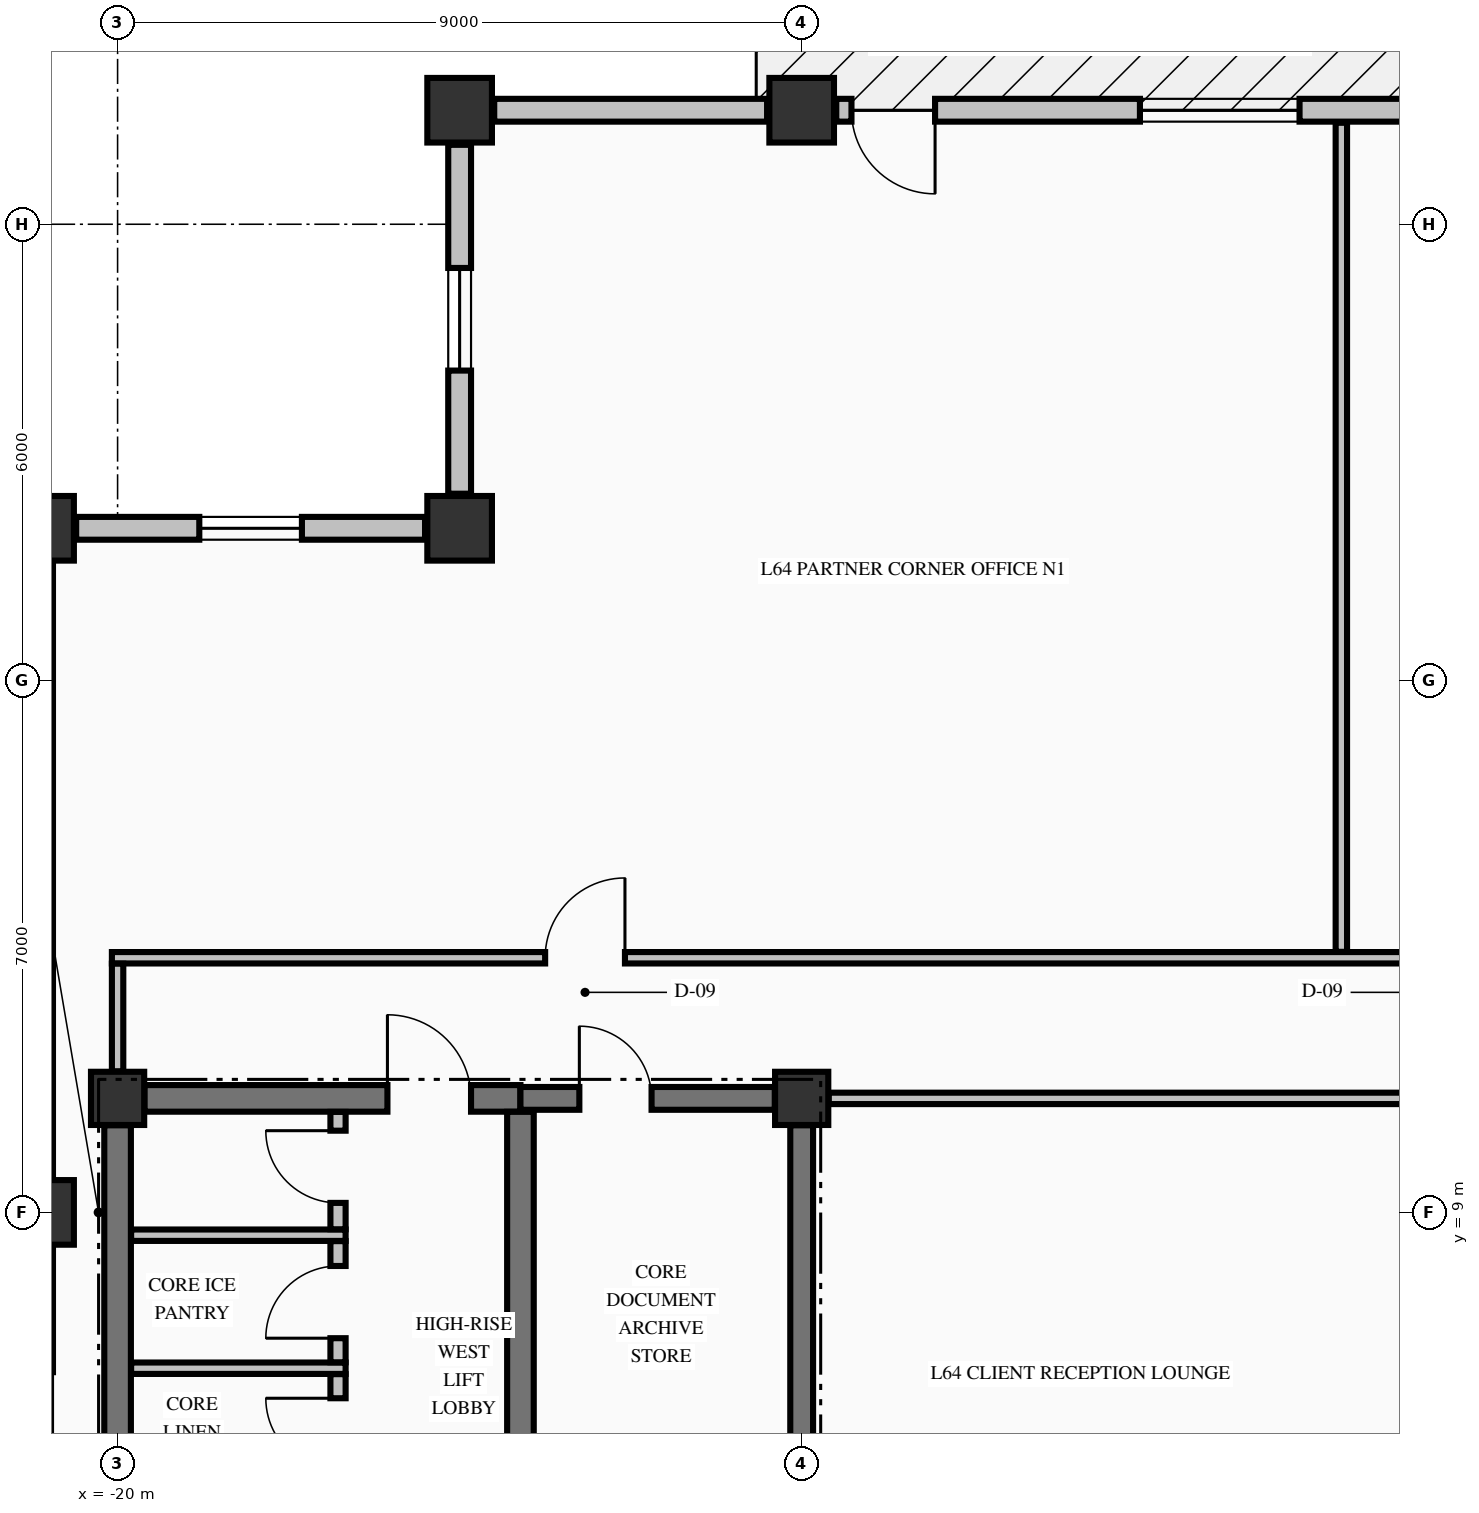
"""IFC4 building model, lengths in metres.
Left out: names, types, materials, properties, quantities, classifications, styles, units other than length and angle.
Written with IfcOpenShell. Run it as: python <this file> out.ifc"""

import sys

from ifc_helpers import new_model, si_unit, direction, frame, frame_2d, origin, origin_2d, place, context, subcontext, project, spatial, rectangle, extrude, element, fill, save


model = new_model("IFC4")
c1 = context("Model", 3, precision=1e-05, world=origin(), true_north=direction((0.0, 1.0)))
c2 = subcontext(c1, "Body", "Model", "MODEL_VIEW")
j1 = project(units=[si_unit("LENGTHUNIT", "METRE"), si_unit("PLANEANGLEUNIT", "RADIAN")], contexts=[c1])
p1 = place(None, origin())
s1 = spatial("IfcSite", under=j1, at=p1, CompositionType="ELEMENT")
p2 = place(p1, origin())
s2 = spatial("IfcBuilding", under=s1, at=p2, CompositionType="ELEMENT")
p3 = place(p2, frame((0.0, 0.0, 242.97)))
s3 = spatial("IfcBuildingStorey", under=s2, at=p3, CompositionType="ELEMENT", Elevation=242.97)
for number, where, z_axis, x_axis in (
    (1, (-15.5, 23.5, -0.25), (0.0, 0.0, 1.0), (1.0, 0.0, 0.0)),
    (2, (-11.0, 23.5, -0.25), (0.0, 0.0, 1.0), (1.0, 0.0, 0.0)),
    (3, (-21.0, 9.0, -0.25), (0.0, 0.0, 1.0), (1.0, 0.0, 0.0)),
    (4, (-21.0, 18.0, -0.25), (0.0, 0.0, 1.0), (1.0, 0.0, 0.0)),
    (5, (-15.5, 18.0, -0.25), (0.0, 0.0, 1.0), (1.0, 0.0, 0.0)),
):
    element("IfcColumn", number, at=place(p3, frame(where, z_axis=z_axis, x_axis=x_axis)), inside=s3, PredefinedType="COLUMN", context=c2, shape_type="SweptSolid", body=[
        extrude(rectangle(XDim=0.85, YDim=0.85, at=origin_2d()), origin(), (0.0, 0.0, 1.0), 3.23),
    ])
for number, where, z_axis, x_axis in (
    (6, (-20.0, 10.5, -0.25), (0.0, 0.0, 1.0), (1.0, 0.0, 0.0)),
    (7, (-11.0, 10.5, -0.25), (0.0, 0.0, 1.0), (1.0, 0.0, 0.0)),
):
    element("IfcColumn", number, at=place(p3, frame(where, z_axis=z_axis, x_axis=x_axis)), inside=s3, PredefinedType="COLUMN", context=c2, shape_type="SweptSolid", body=[
        extrude(rectangle(XDim=0.7, YDim=0.7, at=origin_2d()), origin(), (0.0, 0.0, 1.0), 3.23),
    ])
p4 = place(p3, frame((-15.5, 23.045, 0.0), z_axis=(0.0, 0.0, 1.0), x_axis=(0.0, -1.0, 0.0)))
e8 = element("IfcWall", 8, at=p4, inside=s3, PredefinedType="STANDARD", context=c2, shape_type="SweptSolid", body=[
    extrude(rectangle(XDim=4.59, YDim=0.3, at=frame_2d((2.295, 0.0))), origin(), (0.0, 0.0, 1.0), 2.372),
])
p5 = place(p4, frame((1.62, 0.0, 0.68)))
e9 = element("IfcOpeningElement", 9, at=p5, cuts=e8, PredefinedType="OPENING", context=c2, shape_type="SweptSolid", body=[
    extrude(rectangle(XDim=1.35, YDim=1.42, at=frame_2d((0.675, 0.71))), frame((0.0, 0.16, 0.0), z_axis=(0.0, -1.0, 0.0), x_axis=(1.0, 0.0, 0.0)), (0.0, 0.0, 1.0), 0.32),
])
p6 = place(p3, frame((-15.955, 18.0, 0.0), z_axis=(0.0, 0.0, 1.0), x_axis=(-1.0, 0.0, 0.0)))
e10 = element("IfcWall", 10, at=p6, inside=s3, PredefinedType="STANDARD", context=c2, shape_type="SweptSolid", body=[
    extrude(rectangle(XDim=4.59, YDim=0.3, at=frame_2d((2.295, 0.0))), origin(), (0.0, 0.0, 1.0), 2.372),
])
p7 = place(p6, frame((1.62, 0.0, 0.68)))
e11 = element("IfcOpeningElement", 11, at=p7, cuts=e10, PredefinedType="OPENING", context=c2, shape_type="SweptSolid", body=[
    extrude(rectangle(XDim=1.35, YDim=1.42, at=frame_2d((0.675, 0.71))), frame((0.0, 0.16, 0.0), z_axis=(0.0, -1.0, 0.0), x_axis=(1.0, 0.0, 0.0)), (0.0, 0.0, 1.0), 0.32),
])
p8 = place(p3, frame((-11.455, 23.5, 0.0), z_axis=(0.0, 0.0, 1.0), x_axis=(-1.0, 0.0, 0.0)))
e12 = element("IfcWall", 12, at=p8, inside=s3, PredefinedType="STANDARD", context=c2, shape_type="SweptSolid", body=[
    extrude(rectangle(XDim=3.59, YDim=0.3, at=frame_2d((1.795, 0.0))), origin(), (0.0, 0.0, 1.0), 2.372),
])
p9 = place(p3, frame((-0.455, 23.5, 0.0), z_axis=(0.0, 0.0, 1.0), x_axis=(-1.0, 0.0, 0.0)))
e13 = element("IfcWall", 13, at=p9, inside=s3, PredefinedType="STANDARD", context=c2, shape_type="SweptSolid", body=[
    extrude(rectangle(XDim=10.09, YDim=0.3, at=frame_2d((5.045, 0.0))), origin(), (0.0, 0.0, 1.0), 2.372),
])
p10 = place(p9, frame((8.79, 0.0, 0.0)))
e14 = element("IfcOpeningElement", 14, at=p10, cuts=e13, PredefinedType="OPENING", context=c2, shape_type="SweptSolid", body=[
    extrude(rectangle(XDim=1.1, YDim=2.15, at=frame_2d((0.55, 1.075))), frame((0.0, 0.16, 0.0), z_axis=(0.0, -1.0, 0.0), x_axis=(1.0, 0.0, 0.0)), (0.0, 0.0, 1.0), 0.32),
])
p11 = place(p9, frame((3.995, 0.0, 0.7)))
e15 = element("IfcOpeningElement", 15, at=p11, cuts=e13, PredefinedType="OPENING", context=c2, shape_type="SweptSolid", body=[
    extrude(rectangle(XDim=2.1, YDim=1.5, at=frame_2d((1.05, 0.75))), frame((0.0, 0.16, 0.0), z_axis=(0.0, -1.0, 0.0), x_axis=(1.0, 0.0, 0.0)), (0.0, 0.0, 1.0), 0.32),
])
p12 = place(p3, frame((-21.0, 8.545, 0.0), z_axis=(0.0, 0.0, 1.0), x_axis=(0.0, -1.0, 0.0)))
e16 = element("IfcWall", 16, at=p12, inside=s3, PredefinedType="STANDARD", context=c2, shape_type="SweptSolid", body=[
    extrude(rectangle(XDim=8.09, YDim=0.3, at=frame_2d((4.045, 0.0))), origin(), (0.0, 0.0, 1.0), 2.372),
])
p13 = place(p12, frame((1.647, 0.0, 0.7)))
e17 = element("IfcOpeningElement", 17, at=p13, cuts=e16, PredefinedType="OPENING", context=c2, shape_type="SweptSolid", body=[
    extrude(rectangle(XDim=2.1, YDim=1.5, at=frame_2d((1.05, 0.75))), frame((0.0, 0.16, 0.0), z_axis=(0.0, -1.0, 0.0), x_axis=(1.0, 0.0, 0.0)), (0.0, 0.0, 1.0), 0.32),
])
p14 = place(p12, frame((4.343, 0.0, 0.7)))
e18 = element("IfcOpeningElement", 18, at=p14, cuts=e16, PredefinedType="OPENING", context=c2, shape_type="SweptSolid", body=[
    extrude(rectangle(XDim=2.1, YDim=1.5, at=frame_2d((1.05, 0.75))), frame((0.0, 0.16, 0.0), z_axis=(0.0, -1.0, 0.0), x_axis=(1.0, 0.0, 0.0)), (0.0, 0.0, 1.0), 0.32),
])
p15 = place(p3, frame((-21.0, 17.545, 0.0), z_axis=(0.0, 0.0, 1.0), x_axis=(0.0, -1.0, 0.0)))
e19 = element("IfcWall", 19, at=p15, inside=s3, PredefinedType="STANDARD", context=c2, shape_type="SweptSolid", body=[
    extrude(rectangle(XDim=8.09, YDim=0.3, at=frame_2d((4.045, 0.0))), origin(), (0.0, 0.0, 1.0), 2.372),
])
p16 = place(p3, frame((-19.646, 10.5, 0.0), z_axis=(0.0, 0.0, 1.0), x_axis=(1.0, 0.0, 0.0)))
e20 = element("IfcWall", 20, at=p16, inside=s3, PredefinedType="SHEAR", context=c2, shape_type="SweptSolid", body=[
    extrude(rectangle(XDim=4.946, YDim=0.35, at=frame_2d((2.473, 0.0))), origin(), (0.0, 0.0, 1.0), 2.98),
])
p17 = place(p16, frame((3.196, 0.0, 0.0)))
e21 = element("IfcOpeningElement", 21, at=p17, cuts=e20, PredefinedType="OPENING", context=c2, shape_type="SweptSolid", body=[
    extrude(rectangle(XDim=1.1, YDim=2.15, at=frame_2d((0.55, 1.075))), frame((0.0, 0.185, 0.0), z_axis=(0.0, -1.0, 0.0), x_axis=(1.0, 0.0, 0.0)), (0.0, 0.0, 1.0), 0.37),
])
p18 = place(p3, frame((-14.7, 10.5, 0.0), z_axis=(0.0, 0.0, 1.0), x_axis=(1.0, 0.0, 0.0)))
e22 = element("IfcWall", 22, at=p18, inside=s3, PredefinedType="SHEAR", context=c2, shape_type="SweptSolid", body=[
    extrude(rectangle(XDim=3.346, YDim=0.3, at=frame_2d((1.673, 0.0))), origin(), (0.0, 0.0, 1.0), 2.98),
])
p19 = place(p18, frame((0.775, 0.0, 0.0)))
e23 = element("IfcOpeningElement", 23, at=p19, cuts=e22, PredefinedType="OPENING", context=c2, shape_type="SweptSolid", body=[
    extrude(rectangle(XDim=0.95, YDim=2.15, at=frame_2d((0.475, 1.075))), frame((0.0, 0.16, 0.0), z_axis=(0.0, -1.0, 0.0), x_axis=(1.0, 0.0, 0.0)), (0.0, 0.0, 1.0), 0.32),
])
for number, where, z_axis, x_axis in (
    (24, (-19.822, 6.95, 0.0), (0.0, 0.0, 1.0), (1.0, 0.0, 0.0)),
    (25, (-19.822, 8.7, 0.0), (0.0, 0.0, 1.0), (1.0, 0.0, 0.0)),
):
    element("IfcWall", number, at=place(p3, frame(where, z_axis=z_axis, x_axis=x_axis)), inside=s3, PredefinedType="PARTITIONING", context=c2, shape_type="SweptSolid", body=[
        extrude(rectangle(XDim=2.822, YDim=0.15, at=frame_2d((1.411, 0.0))), origin(), (0.0, 0.0, 1.0), 2.98),
    ])
p20 = place(p3, frame((-10.644, 10.5, 0.0), z_axis=(0.0, 0.0, 1.0), x_axis=(1.0, 0.0, 0.0)))
e26 = element("IfcWall", 26, at=p20, inside=s3, PredefinedType="PARTITIONING", context=c2, shape_type="SweptSolid", body=[
    extrude(rectangle(XDim=21.288, YDim=0.15, at=frame_2d((10.644, 0.0))), origin(), (0.0, 0.0, 1.0), 2.98),
])
p21 = place(p20, frame((13.544, 0.0, 0.0)))
e27 = element("IfcOpeningElement", 27, at=p21, cuts=e26, PredefinedType="OPENING", context=c2, shape_type="SweptSolid", body=[
    extrude(rectangle(XDim=1.1, YDim=2.15, at=frame_2d((0.55, 1.075))), frame((0.0, 0.085, 0.0), z_axis=(0.0, -1.0, 0.0), x_axis=(1.0, 0.0, 0.0)), (0.0, 0.0, 1.0), 0.17),
])
p22 = place(p3, frame((-20.075, 12.35, 0.0), z_axis=(0.0, 0.0, 1.0), x_axis=(1.0, 0.0, 0.0)))
e28 = element("IfcWall", 28, at=p22, inside=s3, PredefinedType="PARTITIONING", context=c2, shape_type="SweptSolid", body=[
    extrude(rectangle(XDim=45.91, YDim=0.15, at=frame_2d((22.955, 0.0))), origin(), (0.0, 0.0, 1.0), 2.98),
])
p23 = place(p22, frame((5.7, 0.0, 0.0)))
e29 = element("IfcOpeningElement", 29, at=p23, cuts=e28, PredefinedType="OPENING", context=c2, shape_type="SweptSolid", body=[
    extrude(rectangle(XDim=1.05, YDim=2.15, at=frame_2d((0.525, 1.075))), frame((0.0, 0.085, 0.0), z_axis=(0.0, -1.0, 0.0), x_axis=(1.0, 0.0, 0.0)), (0.0, 0.0, 1.0), 0.17),
])
p24 = place(p22, frame((17.3, 0.0, 0.0)))
e30 = element("IfcOpeningElement", 30, at=p24, cuts=e28, PredefinedType="OPENING", context=c2, shape_type="SweptSolid", body=[
    extrude(rectangle(XDim=1.05, YDim=2.15, at=frame_2d((0.525, 1.075))), frame((0.0, 0.085, 0.0), z_axis=(0.0, -1.0, 0.0), x_axis=(1.0, 0.0, 0.0)), (0.0, 0.0, 1.0), 0.17),
])
p25 = place(p22, frame((32.5, 0.0, 0.0)))
e31 = element("IfcOpeningElement", 31, at=p25, cuts=e28, PredefinedType="OPENING", context=c2, shape_type="SweptSolid", body=[
    extrude(rectangle(XDim=1.05, YDim=2.15, at=frame_2d((0.525, 1.075))), frame((0.0, 0.085, 0.0), z_axis=(0.0, -1.0, 0.0), x_axis=(1.0, 0.0, 0.0)), (0.0, 0.0, 1.0), 0.17),
])
p26 = place(p3, frame((-20.0, 5.327, 0.0), z_axis=(0.0, 0.0, 1.0), x_axis=(0.0, 1.0, 0.0)))
e32 = element("IfcWall", 32, at=p26, inside=s3, PredefinedType="SHEAR", context=c2, shape_type="SweptSolid", body=[
    extrude(rectangle(XDim=4.819, YDim=0.35, at=frame_2d((2.41, 0.0))), origin(), (0.0, 0.0, 1.0), 2.98),
])
p27 = place(p3, frame((-14.7, 5.852, 0.0), z_axis=(0.0, 0.0, 1.0), x_axis=(0.0, 1.0, 0.0)))
e33 = element("IfcWall", 33, at=p27, inside=s3, PredefinedType="SHEAR", context=c2, shape_type="SweptSolid", body=[
    extrude(rectangle(XDim=4.471, YDim=0.35, at=frame_2d((2.235, 0.0))), origin(), (0.0, 0.0, 1.0), 2.98),
])
p28 = place(p3, frame((-11.0, 5.852, 0.0), z_axis=(0.0, 0.0, 1.0), x_axis=(0.0, 1.0, 0.0)))
e34 = element("IfcWall", 34, at=p28, inside=s3, PredefinedType="SHEAR", context=c2, shape_type="SweptSolid", body=[
    extrude(rectangle(XDim=4.294, YDim=0.3, at=frame_2d((2.147, 0.0))), origin(), (0.0, 0.0, 1.0), 2.98),
])
p29 = place(p3, frame((-20.0, 10.856, 0.0), z_axis=(0.0, 0.0, 1.0), x_axis=(0.0, 1.0, 0.0)))
e35 = element("IfcWall", 35, at=p29, inside=s3, PredefinedType="PARTITIONING", context=c2, shape_type="SweptSolid", body=[
    extrude(rectangle(XDim=1.416, YDim=0.15, at=frame_2d((0.708, 0.0))), origin(), (0.0, 0.0, 1.0), 2.57),
])
p30 = place(p3, frame((-17.1, 5.328, 0.0), z_axis=(0.0, 0.0, 1.0), x_axis=(0.0, 1.0, 0.0)))
e36 = element("IfcWall", 36, at=p30, inside=s3, PredefinedType="PARTITIONING", context=c2, shape_type="SweptSolid", body=[
    extrude(rectangle(XDim=1.544, YDim=0.2, at=frame_2d((0.772, 0.0))), origin(), (0.0, 0.0, 1.0), 2.98),
])
p31 = place(p30, frame((0.277, 0.0, 0.0)))
e37 = element("IfcOpeningElement", 37, at=p31, cuts=e36, PredefinedType="OPENING", context=c2, shape_type="SweptSolid", body=[
    extrude(rectangle(XDim=0.95, YDim=2.15, at=frame_2d((0.475, 1.075))), frame((0.0, 0.11, 0.0), z_axis=(0.0, -1.0, 0.0), x_axis=(1.0, 0.0, 0.0)), (0.0, 0.0, 1.0), 0.22),
])
p32 = place(p3, frame((-17.1, 7.028, 0.0), z_axis=(0.0, 0.0, 1.0), x_axis=(0.0, 1.0, 0.0)))
e38 = element("IfcWall", 38, at=p32, inside=s3, PredefinedType="PARTITIONING", context=c2, shape_type="SweptSolid", body=[
    extrude(rectangle(XDim=1.594, YDim=0.2, at=frame_2d((0.797, 0.0))), origin(), (0.0, 0.0, 1.0), 2.98),
])
p33 = place(p32, frame((0.317, 0.0, 0.0)))
e39 = element("IfcOpeningElement", 39, at=p33, cuts=e38, PredefinedType="OPENING", context=c2, shape_type="SweptSolid", body=[
    extrude(rectangle(XDim=0.95, YDim=2.15, at=frame_2d((0.475, 1.075))), frame((0.0, 0.11, 0.0), z_axis=(0.0, -1.0, 0.0), x_axis=(1.0, 0.0, 0.0)), (0.0, 0.0, 1.0), 0.22),
])
p34 = place(p3, frame((-17.1, 8.778, 0.0), z_axis=(0.0, 0.0, 1.0), x_axis=(0.0, 1.0, 0.0)))
e40 = element("IfcWall", 40, at=p34, inside=s3, PredefinedType="PARTITIONING", context=c2, shape_type="SweptSolid", body=[
    extrude(rectangle(XDim=1.544, YDim=0.2, at=frame_2d((0.772, 0.0))), origin(), (0.0, 0.0, 1.0), 2.98),
])
p35 = place(p34, frame((0.347, 0.0, 0.0)))
e41 = element("IfcOpeningElement", 41, at=p35, cuts=e40, PredefinedType="OPENING", context=c2, shape_type="SweptSolid", body=[
    extrude(rectangle(XDim=0.95, YDim=2.15, at=frame_2d((0.475, 1.075))), frame((0.0, 0.11, 0.0), z_axis=(0.0, -1.0, 0.0), x_axis=(1.0, 0.0, 0.0)), (0.0, 0.0, 1.0), 0.22),
])
p36 = place(p3, frame((-3.9, 12.428, 0.0), z_axis=(0.0, 0.0, 1.0), x_axis=(0.0, 1.0, 0.0)))
e42 = element("IfcWall", 42, at=p36, inside=s3, PredefinedType="PARTITIONING", context=c2, shape_type="SweptSolid", body=[
    extrude(rectangle(XDim=10.907, YDim=0.15, at=frame_2d((5.454, 0.0))), origin(), (0.0, 0.0, 1.0), 2.98),
])
p37 = place(p5, origin())
e43 = element("IfcWindow", 43, at=p37, inside=s3, PartitioningType="SINGLE_PANEL", PredefinedType="WINDOW", context=c2, shape_type="SweptSolid", body=[
    extrude(rectangle(XDim=1.35, YDim=1.42, at=frame_2d((0.675, 0.71))), frame((0.0, 0.03, 0.0), z_axis=(0.0, -1.0, 0.0), x_axis=(1.0, 0.0, 0.0)), (0.0, 0.0, 1.0), 0.06),
])
fill(e9, e43)
p38 = place(p7, origin())
e44 = element("IfcWindow", 44, at=p38, inside=s3, PartitioningType="SINGLE_PANEL", PredefinedType="WINDOW", context=c2, shape_type="SweptSolid", body=[
    extrude(rectangle(XDim=1.35, YDim=1.42, at=frame_2d((0.675, 0.71))), frame((0.0, 0.03, 0.0), z_axis=(0.0, -1.0, 0.0), x_axis=(1.0, 0.0, 0.0)), (0.0, 0.0, 1.0), 0.06),
])
fill(e11, e44)
p39 = place(p10, origin())
e45 = element("IfcDoor", 45, at=p39, inside=s3, OperationType="SINGLE_SWING_LEFT", PredefinedType="DOOR", context=c2, shape_type="SweptSolid", body=[
    extrude(rectangle(XDim=1.1, YDim=2.15, at=frame_2d((0.55, 1.075))), frame((0.0, 0.025, 0.0), z_axis=(0.0, -1.0, 0.0), x_axis=(1.0, 0.0, 0.0)), (0.0, 0.0, 1.0), 0.05),
])
fill(e14, e45)
p40 = place(p11, origin())
e46 = element("IfcWindow", 46, at=p40, inside=s3, PartitioningType="SINGLE_PANEL", PredefinedType="WINDOW", context=c2, shape_type="SweptSolid", body=[
    extrude(rectangle(XDim=2.1, YDim=1.5, at=frame_2d((1.05, 0.75))), frame((0.0, 0.03, 0.0), z_axis=(0.0, -1.0, 0.0), x_axis=(1.0, 0.0, 0.0)), (0.0, 0.0, 1.0), 0.06),
])
fill(e15, e46)
p41 = place(p19, origin())
e47 = element("IfcDoor", 47, at=p41, inside=s3, OperationType="SINGLE_SWING_LEFT", PredefinedType="DOOR", context=c2, shape_type="SweptSolid", body=[
    extrude(rectangle(XDim=0.95, YDim=2.15, at=frame_2d((0.475, 1.075))), frame((0.0, 0.025, 0.0), z_axis=(0.0, -1.0, 0.0), x_axis=(1.0, 0.0, 0.0)), (0.0, 0.0, 1.0), 0.05),
])
fill(e23, e47)
p42 = place(p17, origin())
e48 = element("IfcDoor", 48, at=p42, inside=s3, OperationType="SINGLE_SWING_LEFT", PredefinedType="DOOR", context=c2, shape_type="SweptSolid", body=[
    extrude(rectangle(XDim=1.1, YDim=2.15, at=frame_2d((0.55, 1.075))), frame((0.0, 0.025, 0.0), z_axis=(0.0, -1.0, 0.0), x_axis=(1.0, 0.0, 0.0)), (0.0, 0.0, 1.0), 0.05),
])
fill(e21, e48)
p43 = place(p35, origin())
e49 = element("IfcDoor", 49, at=p43, inside=s3, OperationType="SINGLE_SWING_RIGHT", PredefinedType="DOOR", context=c2, shape_type="SweptSolid", body=[
    extrude(rectangle(XDim=0.95, YDim=2.15, at=frame_2d((0.475, 1.075))), frame((0.0, 0.025, 0.0), z_axis=(0.0, -1.0, 0.0), x_axis=(1.0, 0.0, 0.0)), (0.0, 0.0, 1.0), 0.05),
])
fill(e41, e49)
p44 = place(p33, origin())
e50 = element("IfcDoor", 50, at=p44, inside=s3, OperationType="SINGLE_SWING_LEFT", PredefinedType="DOOR", context=c2, shape_type="SweptSolid", body=[
    extrude(rectangle(XDim=0.95, YDim=2.15, at=frame_2d((0.475, 1.075))), frame((0.0, 0.025, 0.0), z_axis=(0.0, -1.0, 0.0), x_axis=(1.0, 0.0, 0.0)), (0.0, 0.0, 1.0), 0.05),
])
fill(e39, e50)
p45 = place(p31, origin())
e51 = element("IfcDoor", 51, at=p45, inside=s3, OperationType="SINGLE_SWING_RIGHT", PredefinedType="DOOR", context=c2, shape_type="SweptSolid", body=[
    extrude(rectangle(XDim=0.95, YDim=2.15, at=frame_2d((0.475, 1.075))), frame((0.0, 0.025, 0.0), z_axis=(0.0, -1.0, 0.0), x_axis=(1.0, 0.0, 0.0)), (0.0, 0.0, 1.0), 0.05),
])
fill(e37, e51)
p46 = place(p23, origin())
e52 = element("IfcDoor", 52, at=p46, inside=s3, OperationType="SINGLE_SWING_RIGHT", PredefinedType="DOOR", context=c2, shape_type="SweptSolid", body=[
    extrude(rectangle(XDim=1.05, YDim=2.15, at=frame_2d((0.525, 1.075))), frame((0.0, 0.025, 0.0), z_axis=(0.0, -1.0, 0.0), x_axis=(1.0, 0.0, 0.0)), (0.0, 0.0, 1.0), 0.05),
])
fill(e29, e52)
save(model, sys.argv[1])
